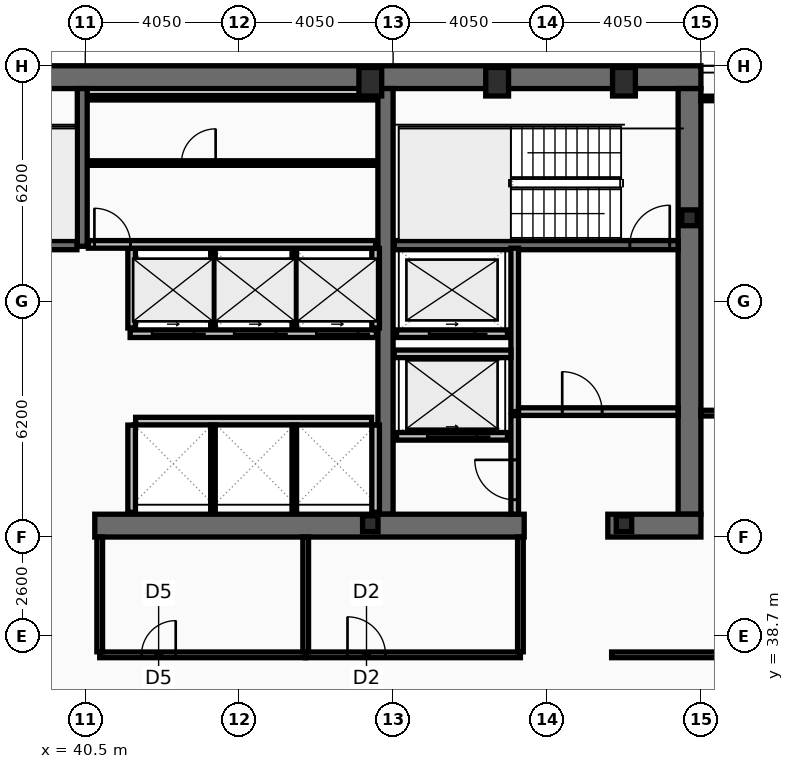
"""IFC4 building model, lengths in metres.
Left out: names, types, materials, properties, quantities, classifications, styles, units other than length and angle.
Written with IfcOpenShell. Run it as: python <this file> out.ifc"""

import sys

from ifc_helpers import new_model, si_unit, direction, frame, frame_2d, origin, origin_2d, place, context, subcontext, project, spatial, rectangle, hollow_rectangle, i_section, extrude, element, fill, save


model = new_model("IFC4")
c1 = context("Model", 3, precision=1e-05, world=origin(), true_north=direction((0.0, 1.0)))
c2 = subcontext(c1, "Body", "Model", "MODEL_VIEW")
j1 = project(units=[si_unit("LENGTHUNIT", "METRE"), si_unit("PLANEANGLEUNIT", "RADIAN")], contexts=[c1])
p1 = place(None, origin())
s1 = spatial("IfcSite", under=j1, at=p1, CompositionType="ELEMENT")
p2 = place(p1, origin())
s2 = spatial("IfcBuilding", under=s1, at=p2, CompositionType="ELEMENT")
p3 = place(p2, frame((0.0, 0.0, 206.6)))
s3 = spatial("IfcBuildingStorey", under=s2, at=p3, CompositionType="ELEMENT", Elevation=206.6)
p4 = place(p3, frame((16.2, 53.4, 0.0), z_axis=(0.0, 0.0, 1.0), x_axis=(1.0, 0.0, 0.0)))
e1 = element("IfcWall", 1, at=p4, inside=s3, PredefinedType="SHEAR", context=c2, shape_type="SweptSolid", body=[
    extrude(rectangle(XDim=40.5, YDim=0.6, at=frame_2d((20.25, 0.0))), origin(), (0.0, 0.0, 1.0), 3.44),
])
p5 = place(p3, frame((56.4, 53.1, 0.0), z_axis=(0.0, 0.0, 1.0), x_axis=(0.0, -1.0, 0.0)))
e2 = element("IfcWall", 2, at=p5, inside=s3, PredefinedType="SHEAR", context=c2, shape_type="SweptSolid", body=[
    extrude(rectangle(XDim=11.2, YDim=0.6, at=frame_2d((5.6, 0.0))), origin(), (0.0, 0.0, 1.0), 3.44),
])
p6 = place(p3, frame((48.4, 41.9, 0.0), z_axis=(0.0, 0.0, 1.0), x_axis=(0.0, 1.0, 0.0)))
e3 = element("IfcWall", 3, at=p6, inside=s3, PredefinedType="SHEAR", context=c2, shape_type="SweptSolid", body=[
    extrude(rectangle(XDim=11.2, YDim=0.4, at=frame_2d((5.6, 0.0))), origin(), (0.0, 0.0, 1.0), 3.44),
])
p7 = place(p3, frame((52.05, 41.6, 0.0), z_axis=(0.0, 0.0, 1.0), x_axis=(-1.0, 0.0, 0.0)))
e4 = element("IfcWall", 4, at=p7, inside=s3, PredefinedType="SHEAR", context=c2, shape_type="SweptSolid", body=[
    extrude(rectangle(XDim=11.3, YDim=0.6, at=frame_2d((5.65, 0.0))), origin(), (0.0, 0.0, 1.0), 3.44),
])
p8 = place(p3, frame((56.7, 41.6, 0.0), z_axis=(0.0, 0.0, 1.0), x_axis=(-1.0, 0.0, 0.0)))
e5 = element("IfcWall", 5, at=p8, inside=s3, PredefinedType="SHEAR", context=c2, shape_type="SweptSolid", body=[
    extrude(rectangle(XDim=2.45, YDim=0.6, at=frame_2d((1.225, 0.0))), origin(), (0.0, 0.0, 1.0), 3.44),
])
p9 = place(p3, frame((40.42, 48.95, 0.0), z_axis=(0.0, 0.0, 1.0), x_axis=(0.0, 1.0, 0.0)))
e6 = element("IfcWall", 6, at=p9, inside=s3, PredefinedType="SHEAR", context=c2, shape_type="SweptSolid", body=[
    extrude(rectangle(XDim=4.15, YDim=0.26, at=frame_2d((2.075, 0.0))), origin(), (0.0, 0.0, 1.0), 3.44),
])
p10 = place(p3, frame((48.63, 48.98, 0.0), z_axis=(0.0, 0.0, 1.0), x_axis=(1.0, 0.0, 0.0)))
e7 = element("IfcWall", 7, at=p10, inside=s3, PredefinedType="SHEAR", context=c2, shape_type="SweptSolid", body=[
    extrude(rectangle(XDim=7.47, YDim=0.24, at=frame_2d((3.735, 0.0))), origin(), (0.0, 0.0, 1.0), 3.44),
])
p11 = place(p10, frame((6.2, 0.0, 0.0)))
e8 = element("IfcOpeningElement", 8, at=p11, cuts=e7, PredefinedType="OPENING", context=c2, shape_type="SweptSolid", body=[
    extrude(rectangle(XDim=1.05, YDim=2.15, at=frame_2d((0.525, 1.075))), frame((0.0, 0.13, 0.0), z_axis=(0.0, -1.0, 0.0), x_axis=(1.0, 0.0, 0.0)), (0.0, 0.0, 1.0), 0.26),
])
p12 = place(p3, frame((32.72, 48.98, 0.0), z_axis=(0.0, 0.0, 1.0), x_axis=(1.0, 0.0, 0.0)))
e9 = element("IfcWall", 9, at=p12, inside=s3, PredefinedType="SHEAR", context=c2, shape_type="SweptSolid", body=[
    extrude(rectangle(XDim=7.56, YDim=0.24, at=frame_2d((3.78, 0.0))), origin(), (0.0, 0.0, 1.0), 3.44),
])
p13 = place(p12, frame((0.22, 0.0, 0.0)))
e10 = element("IfcOpeningElement", 10, at=p13, cuts=e9, PredefinedType="OPENING", context=c2, shape_type="SweptSolid", body=[
    extrude(rectangle(XDim=1.05, YDim=2.15, at=frame_2d((0.525, 1.075))), frame((0.0, 0.13, 0.0), z_axis=(0.0, -1.0, 0.0), x_axis=(1.0, 0.0, 0.0)), (0.0, 0.0, 1.0), 0.26),
])
for number, where, z_axis, x_axis in (
    (11, (48.0, 53.28, 0.0), (0.0, 0.0, 1.0), (1.0, 0.0, 0.0)),
    (12, (51.337, 53.28, 0.0), (0.0, 0.0, 1.0), (1.0, 0.0, 0.0)),
    (13, (54.675, 53.28, 0.0), (0.0, 0.0, 1.0), (1.0, 0.0, 0.0)),
):
    element("IfcColumn", number, at=place(p3, frame(where, z_axis=z_axis, x_axis=x_axis)), inside=s3, PredefinedType="COLUMN", context=c2, shape_type="SweptSolid", body=[
        extrude(hollow_rectangle(XDim=0.6, YDim=0.75, WallThickness=0.045, at=origin_2d()), origin(), (0.0, 0.0, 1.0), 3.6),
    ])
for number, where, z_axis, x_axis in (
    (14, (56.4, 49.7, 0.0), (0.0, 0.0, 1.0), (1.0, 0.0, 0.0)),
    (15, (48.0, 41.65, 0.0), (0.0, 0.0, 1.0), (1.0, 0.0, 0.0)),
    (16, (54.675, 41.65, 0.0), (0.0, 0.0, 1.0), (1.0, 0.0, 0.0)),
):
    element("IfcColumn", number, at=place(p3, frame(where, z_axis=z_axis, x_axis=x_axis)), inside=s3, PredefinedType="COLUMN", context=c2, shape_type="SweptSolid", body=[
        extrude(i_section(OverallWidth=0.406, OverallDepth=0.416, WebThickness=0.03, FlangeThickness=0.048, at=origin_2d()), origin(), (0.0, 0.0, 1.0), 3.6),
    ])
p14 = place(p3, frame((51.61, 43.95, 0.0), z_axis=(0.0, 0.0, 1.0), x_axis=(-1.0, 0.0, 0.0)))
e17 = element("IfcWall", 17, at=p14, inside=s3, PredefinedType="PARTITIONING", context=c2, shape_type="SweptSolid", body=[
    extrude(rectangle(XDim=2.92, YDim=0.2, at=frame_2d((1.46, 0.0))), origin(), (0.0, 0.0, 1.0), 3.44),
])
p15 = place(p14, frame((0.81, 0.0, 0.0)))
e18 = element("IfcOpeningElement", 18, at=p15, cuts=e17, PredefinedType="OPENING", context=c2, shape_type="SweptSolid", body=[
    extrude(rectangle(XDim=1.3, YDim=2.18, at=frame_2d((0.65, 1.09))), frame((0.0, 0.11, 0.0), z_axis=(0.0, -1.0, 0.0), x_axis=(1.0, 0.0, 0.0)), (0.0, 0.0, 1.0), 0.22),
])
p16 = place(p3, frame((51.61, 46.65, 0.0), z_axis=(0.0, 0.0, 1.0), x_axis=(-1.0, 0.0, 0.0)))
e19 = element("IfcWall", 19, at=p16, inside=s3, PredefinedType="PARTITIONING", context=c2, shape_type="SweptSolid", body=[
    extrude(rectangle(XDim=2.92, YDim=0.2, at=frame_2d((1.46, 0.0))), origin(), (0.0, 0.0, 1.0), 3.44),
])
p17 = place(p16, frame((0.86, 0.0, 0.0)))
e20 = element("IfcOpeningElement", 20, at=p17, cuts=e19, PredefinedType="OPENING", context=c2, shape_type="SweptSolid", body=[
    extrude(rectangle(XDim=1.2, YDim=2.18, at=frame_2d((0.6, 1.09))), frame((0.0, 0.11, 0.0), z_axis=(0.0, -1.0, 0.0), x_axis=(1.0, 0.0, 0.0)), (0.0, 0.0, 1.0), 0.22),
])
p18 = place(p3, frame((48.16, 46.65, 0.0), z_axis=(0.0, 0.0, 1.0), x_axis=(-1.0, 0.0, 0.0)))
e21 = element("IfcWall", 21, at=p18, inside=s3, PredefinedType="PARTITIONING", context=c2, shape_type="SweptSolid", body=[
    extrude(rectangle(XDim=6.48, YDim=0.2, at=frame_2d((3.24, 0.0))), origin(), (0.0, 0.0, 1.0), 3.44),
])
p19 = place(p18, frame((4.8, 0.0, 0.0)))
e22 = element("IfcOpeningElement", 22, at=p19, cuts=e21, PredefinedType="OPENING", context=c2, shape_type="SweptSolid", body=[
    extrude(rectangle(XDim=1.1, YDim=2.18, at=frame_2d((0.55, 1.09))), frame((0.0, 0.11, 0.0), z_axis=(0.0, -1.0, 0.0), x_axis=(1.0, 0.0, 0.0)), (0.0, 0.0, 1.0), 0.22),
])
p20 = place(p18, frame((2.64, 0.0, 0.0)))
e23 = element("IfcOpeningElement", 23, at=p20, cuts=e21, PredefinedType="OPENING", context=c2, shape_type="SweptSolid", body=[
    extrude(rectangle(XDim=1.1, YDim=2.18, at=frame_2d((0.55, 1.09))), frame((0.0, 0.11, 0.0), z_axis=(0.0, -1.0, 0.0), x_axis=(1.0, 0.0, 0.0)), (0.0, 0.0, 1.0), 0.22),
])
p21 = place(p18, frame((0.48, 0.0, 0.0)))
e24 = element("IfcOpeningElement", 24, at=p21, cuts=e21, PredefinedType="OPENING", context=c2, shape_type="SweptSolid", body=[
    extrude(rectangle(XDim=1.1, YDim=2.18, at=frame_2d((0.55, 1.09))), frame((0.0, 0.11, 0.0), z_axis=(0.0, -1.0, 0.0), x_axis=(1.0, 0.0, 0.0)), (0.0, 0.0, 1.0), 0.22),
])
p22 = place(p3, frame((51.8, 44.6, 0.0), z_axis=(0.0, 0.0, 1.0), x_axis=(0.0, 1.0, 0.0)))
e25 = element("IfcWall", 25, at=p22, inside=s3, PredefinedType="PARTITIONING", context=c2, shape_type="SweptSolid", body=[
    extrude(rectangle(XDim=4.3, YDim=0.2, at=frame_2d((2.15, 0.0))), origin(), (0.0, 0.0, 1.0), 3.44),
])
p23 = place(p3, frame((51.9, 44.6, 0.0), z_axis=(0.0, 0.0, 1.0), x_axis=(1.0, 0.0, 0.0)))
e26 = element("IfcWall", 26, at=p23, inside=s3, PredefinedType="PARTITIONING", context=c2, shape_type="SweptSolid", body=[
    extrude(rectangle(XDim=4.2, YDim=0.2, at=frame_2d((2.1, 0.0))), origin(), (0.0, 0.0, 1.0), 3.44),
])
p24 = place(p23, frame((1.15, 0.0, 0.0)))
e27 = element("IfcOpeningElement", 27, at=p24, cuts=e26, PredefinedType="OPENING", context=c2, shape_type="SweptSolid", body=[
    extrude(rectangle(XDim=1.05, YDim=2.15, at=frame_2d((0.525, 1.075))), frame((0.0, 0.11, 0.0), z_axis=(0.0, -1.0, 0.0), x_axis=(1.0, 0.0, 0.0)), (0.0, 0.0, 1.0), 0.22),
])
p25 = place(p3, frame((48.63, 46.12, 0.0), z_axis=(0.0, 0.0, 1.0), x_axis=(1.0, 0.0, 0.0)))
e28 = element("IfcWall", 28, at=p25, inside=s3, PredefinedType="PARTITIONING", context=c2, shape_type="SweptSolid", body=[
    extrude(rectangle(XDim=3.07, YDim=0.2, at=frame_2d((1.535, 0.0))), origin(), (0.0, 0.0, 1.0), 3.44),
])
p26 = place(p3, frame((51.8, 41.9, 0.0), z_axis=(0.0, 0.0, 1.0), x_axis=(0.0, 1.0, 0.0)))
e29 = element("IfcWall", 29, at=p26, inside=s3, PredefinedType="PARTITIONING", context=c2, shape_type="SweptSolid", body=[
    extrude(rectangle(XDim=2.595, YDim=0.2, at=frame_2d((1.298, 0.0))), origin(), (0.0, 0.0, 1.0), 3.44),
])
p27 = place(p26, frame((0.38, 0.0, 0.0)))
e30 = element("IfcOpeningElement", 30, at=p27, cuts=e29, PredefinedType="OPENING", context=c2, shape_type="SweptSolid", body=[
    extrude(rectangle(XDim=1.05, YDim=2.15, at=frame_2d((0.525, 1.075))), frame((0.0, 0.11, 0.0), z_axis=(0.0, -1.0, 0.0), x_axis=(1.0, 0.0, 0.0)), (0.0, 0.0, 1.0), 0.22),
])
for number, where, z_axis, x_axis in (
    (31, (41.72, 46.8, 0.0), (0.0, 0.0, 1.0), (0.0, 1.0, 0.0)),
    (32, (48.14, 46.8, 0.0), (0.0, 0.0, 1.0), (0.0, 1.0, 0.0)),
):
    element("IfcWall", number, at=place(p3, frame(where, z_axis=z_axis, x_axis=x_axis)), inside=s3, PredefinedType="PARTITIONING", context=c2, shape_type="SweptSolid", body=[
        extrude(rectangle(XDim=2.095, YDim=0.2, at=frame_2d((1.047, 0.0))), origin(), (0.0, 0.0, 1.0), 3.44),
    ])
for number, where, z_axis, x_axis in (
    (33, (43.86, 46.8, 0.0), (0.0, 0.0, 1.0), (0.0, 1.0, 0.0)),
    (34, (46.0, 46.8, 0.0), (0.0, 0.0, 1.0), (0.0, 1.0, 0.0)),
):
    element("IfcWall", number, at=place(p3, frame(where, z_axis=z_axis, x_axis=x_axis)), inside=s3, PredefinedType="PARTITIONING", context=c2, shape_type="SweptSolid", body=[
        extrude(rectangle(XDim=2.095, YDim=0.12, at=frame_2d((1.047, 0.0))), origin(), (0.0, 0.0, 1.0), 3.44),
    ])
p28 = place(p3, frame((41.825, 44.35, 0.0), z_axis=(0.0, 0.0, 1.0), x_axis=(1.0, 0.0, 0.0)))
e35 = element("IfcWall", 35, at=p28, inside=s3, PredefinedType="PARTITIONING", context=c2, shape_type="SweptSolid", body=[
    extrude(rectangle(XDim=6.21, YDim=0.2, at=frame_2d((3.105, 0.0))), origin(), (0.0, 0.0, 1.0), 3.44),
])
for number, where, z_axis, x_axis in (
    (36, (41.72, 41.95, 0.0), (0.0, 0.0, 1.0), (0.0, 1.0, 0.0)),
    (37, (48.14, 41.95, 0.0), (0.0, 0.0, 1.0), (0.0, 1.0, 0.0)),
):
    element("IfcWall", number, at=place(p3, frame(where, z_axis=z_axis, x_axis=x_axis)), inside=s3, PredefinedType="PARTITIONING", context=c2, shape_type="SweptSolid", body=[
        extrude(rectangle(XDim=2.295, YDim=0.2, at=frame_2d((1.147, 0.0))), origin(), (0.0, 0.0, 1.0), 3.44),
    ])
for number, where, z_axis, x_axis in (
    (38, (43.86, 41.95, 0.0), (0.0, 0.0, 1.0), (0.0, 1.0, 0.0)),
    (39, (46.0, 41.95, 0.0), (0.0, 0.0, 1.0), (0.0, 1.0, 0.0)),
):
    element("IfcWall", number, at=place(p3, frame(where, z_axis=z_axis, x_axis=x_axis)), inside=s3, PredefinedType="PARTITIONING", context=c2, shape_type="SweptSolid", body=[
        extrude(rectangle(XDim=2.295, YDim=0.12, at=frame_2d((1.147, 0.0))), origin(), (0.0, 0.0, 1.0), 3.44),
    ])
p29 = place(p3, frame((40.58, 52.86, 0.0), z_axis=(0.0, 0.0, 1.0), x_axis=(1.0, 0.0, 0.0)))
e40 = element("IfcWall", 40, at=p29, inside=s3, PredefinedType="PARTITIONING", context=c2, shape_type="SweptSolid", body=[
    extrude(rectangle(XDim=7.56, YDim=0.12, at=frame_2d((3.78, 0.0))), origin(), (0.0, 0.0, 1.0), 3.44),
])
p30 = place(p3, frame((40.58, 49.0, 0.0), z_axis=(0.0, 0.0, 1.0), x_axis=(1.0, 0.0, 0.0)))
e41 = element("IfcWall", 41, at=p30, inside=s3, PredefinedType="PARTITIONING", context=c2, shape_type="SweptSolid", body=[
    extrude(rectangle(XDim=7.56, YDim=0.2, at=frame_2d((3.78, 0.0))), origin(), (0.0, 0.0, 1.0), 3.44),
])
p31 = place(p30, frame((0.16, 0.0, 0.0)))
e42 = element("IfcOpeningElement", 42, at=p31, cuts=e41, PredefinedType="OPENING", context=c2, shape_type="SweptSolid", body=[
    extrude(rectangle(XDim=0.95, YDim=2.1, at=frame_2d((0.475, 1.05))), frame((0.0, 0.11, 0.0), z_axis=(0.0, -1.0, 0.0), x_axis=(1.0, 0.0, 0.0)), (0.0, 0.0, 1.0), 0.22),
])
p32 = place(p3, frame((40.63, 51.14, 0.0), z_axis=(0.0, 0.0, 1.0), x_axis=(1.0, 0.0, 0.0)))
e43 = element("IfcWall", 43, at=p32, inside=s3, PredefinedType="PARTITIONING", context=c2, shape_type="SweptSolid", body=[
    extrude(rectangle(XDim=7.46, YDim=0.12, at=frame_2d((3.73, 0.0))), origin(), (0.0, 0.0, 1.0), 3.44),
])
p33 = place(p32, frame((2.4, 0.0, 0.0)))
e44 = element("IfcOpeningElement", 44, at=p33, cuts=e43, PredefinedType="OPENING", context=c2, shape_type="SweptSolid", body=[
    extrude(rectangle(XDim=0.9, YDim=2.05, at=frame_2d((0.45, 1.025))), frame((0.0, 0.07, 0.0), z_axis=(0.0, -1.0, 0.0), x_axis=(1.0, 0.0, 0.0)), (0.0, 0.0, 1.0), 0.14),
])
p34 = place(p3, frame((40.88, 38.2, 0.0), z_axis=(0.0, 0.0, 1.0), x_axis=(1.0, 0.0, 0.0)))
e45 = element("IfcWall", 45, at=p34, inside=s3, PredefinedType="PARTITIONING", context=c2, shape_type="SweptSolid", body=[
    extrude(rectangle(XDim=5.42, YDim=0.15, at=frame_2d((2.71, 0.0))), origin(), (0.0, 0.0, 1.0), 2.73),
])
p35 = place(p34, frame((1.1, 0.0, 0.0)))
e46 = element("IfcOpeningElement", 46, at=p35, cuts=e45, PredefinedType="OPENING", context=c2, shape_type="SweptSolid", body=[
    extrude(rectangle(XDim=0.9, YDim=2.05, at=frame_2d((0.45, 1.025))), frame((0.0, 0.085, 0.0), z_axis=(0.0, -1.0, 0.0), x_axis=(1.0, 0.0, 0.0)), (0.0, 0.0, 1.0), 0.17),
])
p36 = place(p3, frame((46.3, 38.2, 0.0), z_axis=(0.0, 0.0, 1.0), x_axis=(1.0, 0.0, 0.0)))
e47 = element("IfcWall", 47, at=p36, inside=s3, PredefinedType="PARTITIONING", context=c2, shape_type="SweptSolid", body=[
    extrude(rectangle(XDim=5.65, YDim=0.15, at=frame_2d((2.825, 0.0))), origin(), (0.0, 0.0, 1.0), 2.73),
])
p37 = place(p36, frame((1.1, 0.0, 0.0)))
e48 = element("IfcOpeningElement", 48, at=p37, cuts=e47, PredefinedType="OPENING", context=c2, shape_type="SweptSolid", body=[
    extrude(rectangle(XDim=1.0, YDim=2.05, at=frame_2d((0.5, 1.025))), frame((0.0, 0.085, 0.0), z_axis=(0.0, -1.0, 0.0), x_axis=(1.0, 0.0, 0.0)), (0.0, 0.0, 1.0), 0.17),
])
for number, where, z_axis, x_axis in (
    (49, (40.88, 38.28, 0.0), (0.0, 0.0, 1.0), (0.0, 1.0, 0.0)),
    (50, (46.3, 38.28, 0.0), (0.0, 0.0, 1.0), (0.0, 1.0, 0.0)),
    (51, (51.95, 38.28, 0.0), (0.0, 0.0, 1.0), (0.0, 1.0, 0.0)),
):
    element("IfcWall", number, at=place(p3, frame(where, z_axis=z_axis, x_axis=x_axis)), inside=s3, PredefinedType="PARTITIONING", context=c2, shape_type="SweptSolid", body=[
        extrude(rectangle(XDim=3.02, YDim=0.15, at=frame_2d((1.51, 0.0))), origin(), (0.0, 0.0, 1.0), 3.44),
    ])
p38 = place(p3, frame((54.35, 38.2, 0.0), z_axis=(0.0, 0.0, 1.0), x_axis=(1.0, 0.0, 0.0)))
e52 = element("IfcWall", 52, at=p38, inside=s3, PredefinedType="PARTITIONING", context=c2, shape_type="SweptSolid", body=[
    extrude(rectangle(XDim=10.52, YDim=0.15, at=frame_2d((5.26, 0.0))), origin(), (0.0, 0.0, 1.0), 2.73),
])
p39 = place(p38, frame((3.25, 0.0, 0.0)))
e53 = element("IfcOpeningElement", 53, at=p39, cuts=e52, PredefinedType="OPENING", context=c2, shape_type="SweptSolid", body=[
    extrude(rectangle(XDim=0.95, YDim=2.05, at=frame_2d((0.475, 1.025))), frame((0.0, 0.085, 0.0), z_axis=(0.0, -1.0, 0.0), x_axis=(1.0, 0.0, 0.0)), (0.0, 0.0, 1.0), 0.17),
])
p40 = place(p3, frame((56.7, 44.56, 0.0), z_axis=(0.0, 0.0, 1.0), x_axis=(1.0, 0.0, 0.0)))
e54 = element("IfcWall", 54, at=p40, inside=s3, PredefinedType="PARTITIONING", context=c2, shape_type="SweptSolid", body=[
    extrude(rectangle(XDim=8.105, YDim=0.15, at=frame_2d((4.052, 0.0))), origin(), (0.0, 0.0, 1.0), 2.83),
])
p41 = place(p40, frame((0.9, 0.0, 0.0)))
e55 = element("IfcOpeningElement", 55, at=p41, cuts=e54, PredefinedType="OPENING", context=c2, shape_type="SweptSolid", body=[
    extrude(rectangle(XDim=0.9, YDim=2.05, at=frame_2d((0.45, 1.025))), frame((0.0, 0.085, 0.0), z_axis=(0.0, -1.0, 0.0), x_axis=(1.0, 0.0, 0.0)), (0.0, 0.0, 1.0), 0.17),
])
p42 = place(p3, frame((56.7, 52.84, 0.0), z_axis=(0.0, 0.0, 1.0), x_axis=(1.0, 0.0, 0.0)))
e56 = element("IfcWall", 56, at=p42, inside=s3, PredefinedType="PARTITIONING", context=c2, shape_type="SweptSolid", body=[
    extrude(rectangle(XDim=8.105, YDim=0.12, at=frame_2d((4.052, 0.0))), origin(), (0.0, 0.0, 1.0), 3.44),
])
p43 = place(p11, origin())
e57 = element("IfcDoor", 57, at=p43, inside=s3, OperationType="SINGLE_SWING_RIGHT", PredefinedType="DOOR", context=c2, shape_type="SweptSolid", body=[
    extrude(rectangle(XDim=1.05, YDim=2.15, at=frame_2d((0.525, 1.075))), frame((0.0, 0.025, 0.0), z_axis=(0.0, -1.0, 0.0), x_axis=(1.0, 0.0, 0.0)), (0.0, 0.0, 1.0), 0.05),
])
fill(e8, e57)
p44 = place(p15, origin())
e58 = element("IfcDoor", 58, at=p44, inside=s3, OperationType="SLIDING_TO_LEFT", PredefinedType="DOOR", context=c2, shape_type="SweptSolid", body=[
    extrude(rectangle(XDim=1.3, YDim=2.18, at=frame_2d((0.65, 1.09))), frame((0.0, 0.025, 0.0), z_axis=(0.0, -1.0, 0.0), x_axis=(1.0, 0.0, 0.0)), (0.0, 0.0, 1.0), 0.05),
])
fill(e18, e58)
p45 = place(p17, origin())
e59 = element("IfcDoor", 59, at=p45, inside=s3, OperationType="SLIDING_TO_LEFT", PredefinedType="DOOR", context=c2, shape_type="SweptSolid", body=[
    extrude(rectangle(XDim=1.2, YDim=2.18, at=frame_2d((0.6, 1.09))), frame((0.0, 0.025, 0.0), z_axis=(0.0, -1.0, 0.0), x_axis=(1.0, 0.0, 0.0)), (0.0, 0.0, 1.0), 0.05),
])
fill(e20, e59)
p46 = place(p19, origin())
e60 = element("IfcDoor", 60, at=p46, inside=s3, OperationType="SLIDING_TO_LEFT", PredefinedType="DOOR", context=c2, shape_type="SweptSolid", body=[
    extrude(rectangle(XDim=1.1, YDim=2.18, at=frame_2d((0.55, 1.09))), frame((0.0, 0.025, 0.0), z_axis=(0.0, -1.0, 0.0), x_axis=(1.0, 0.0, 0.0)), (0.0, 0.0, 1.0), 0.05),
])
fill(e22, e60)
p47 = place(p20, origin())
e61 = element("IfcDoor", 61, at=p47, inside=s3, OperationType="SLIDING_TO_LEFT", PredefinedType="DOOR", context=c2, shape_type="SweptSolid", body=[
    extrude(rectangle(XDim=1.1, YDim=2.18, at=frame_2d((0.55, 1.09))), frame((0.0, 0.025, 0.0), z_axis=(0.0, -1.0, 0.0), x_axis=(1.0, 0.0, 0.0)), (0.0, 0.0, 1.0), 0.05),
])
fill(e23, e61)
p48 = place(p21, origin())
e62 = element("IfcDoor", 62, at=p48, inside=s3, OperationType="SLIDING_TO_LEFT", PredefinedType="DOOR", context=c2, shape_type="SweptSolid", body=[
    extrude(rectangle(XDim=1.1, YDim=2.18, at=frame_2d((0.55, 1.09))), frame((0.0, 0.025, 0.0), z_axis=(0.0, -1.0, 0.0), x_axis=(1.0, 0.0, 0.0)), (0.0, 0.0, 1.0), 0.05),
])
fill(e24, e62)
p49 = place(p24, origin())
e63 = element("IfcDoor", 63, at=p49, inside=s3, OperationType="SINGLE_SWING_LEFT", PredefinedType="DOOR", context=c2, shape_type="SweptSolid", body=[
    extrude(rectangle(XDim=1.05, YDim=2.15, at=frame_2d((0.525, 1.075))), frame((0.0, 0.025, 0.0), z_axis=(0.0, -1.0, 0.0), x_axis=(1.0, 0.0, 0.0)), (0.0, 0.0, 1.0), 0.05),
])
fill(e27, e63)
p50 = place(p27, origin())
e64 = element("IfcDoor", 64, at=p50, inside=s3, OperationType="SINGLE_SWING_RIGHT", PredefinedType="DOOR", context=c2, shape_type="SweptSolid", body=[
    extrude(rectangle(XDim=1.05, YDim=2.15, at=frame_2d((0.525, 1.075))), frame((0.0, 0.025, 0.0), z_axis=(0.0, -1.0, 0.0), x_axis=(1.0, 0.0, 0.0)), (0.0, 0.0, 1.0), 0.05),
])
fill(e30, e64)
p51 = place(p31, origin())
e65 = element("IfcDoor", 65, at=p51, inside=s3, OperationType="SINGLE_SWING_LEFT", PredefinedType="DOOR", context=c2, shape_type="SweptSolid", body=[
    extrude(rectangle(XDim=0.95, YDim=2.1, at=frame_2d((0.475, 1.05))), frame((0.0, 0.025, 0.0), z_axis=(0.0, -1.0, 0.0), x_axis=(1.0, 0.0, 0.0)), (0.0, 0.0, 1.0), 0.05),
])
fill(e42, e65)
p52 = place(p33, origin())
e66 = element("IfcDoor", 66, at=p52, inside=s3, OperationType="SINGLE_SWING_RIGHT", PredefinedType="DOOR", context=c2, shape_type="SweptSolid", body=[
    extrude(rectangle(XDim=0.9, YDim=2.05, at=frame_2d((0.45, 1.025))), frame((0.0, 0.025, 0.0), z_axis=(0.0, -1.0, 0.0), x_axis=(1.0, 0.0, 0.0)), (0.0, 0.0, 1.0), 0.05),
])
fill(e44, e66)
p53 = place(p35, origin())
e67 = element("IfcDoor", 67, at=p53, inside=s3, OperationType="SINGLE_SWING_RIGHT", PredefinedType="DOOR", context=c2, shape_type="SweptSolid", body=[
    extrude(rectangle(XDim=0.9, YDim=2.05, at=frame_2d((0.45, 1.025))), frame((0.0, 0.025, 0.0), z_axis=(0.0, -1.0, 0.0), x_axis=(1.0, 0.0, 0.0)), (0.0, 0.0, 1.0), 0.05),
])
fill(e46, e67)
p54 = place(p37, origin())
e68 = element("IfcDoor", 68, at=p54, inside=s3, OperationType="SINGLE_SWING_LEFT", PredefinedType="DOOR", context=c2, shape_type="SweptSolid", body=[
    extrude(rectangle(XDim=1.0, YDim=2.05, at=frame_2d((0.5, 1.025))), frame((0.0, 0.025, 0.0), z_axis=(0.0, -1.0, 0.0), x_axis=(1.0, 0.0, 0.0)), (0.0, 0.0, 1.0), 0.05),
])
fill(e48, e68)
save(model, sys.argv[1])
